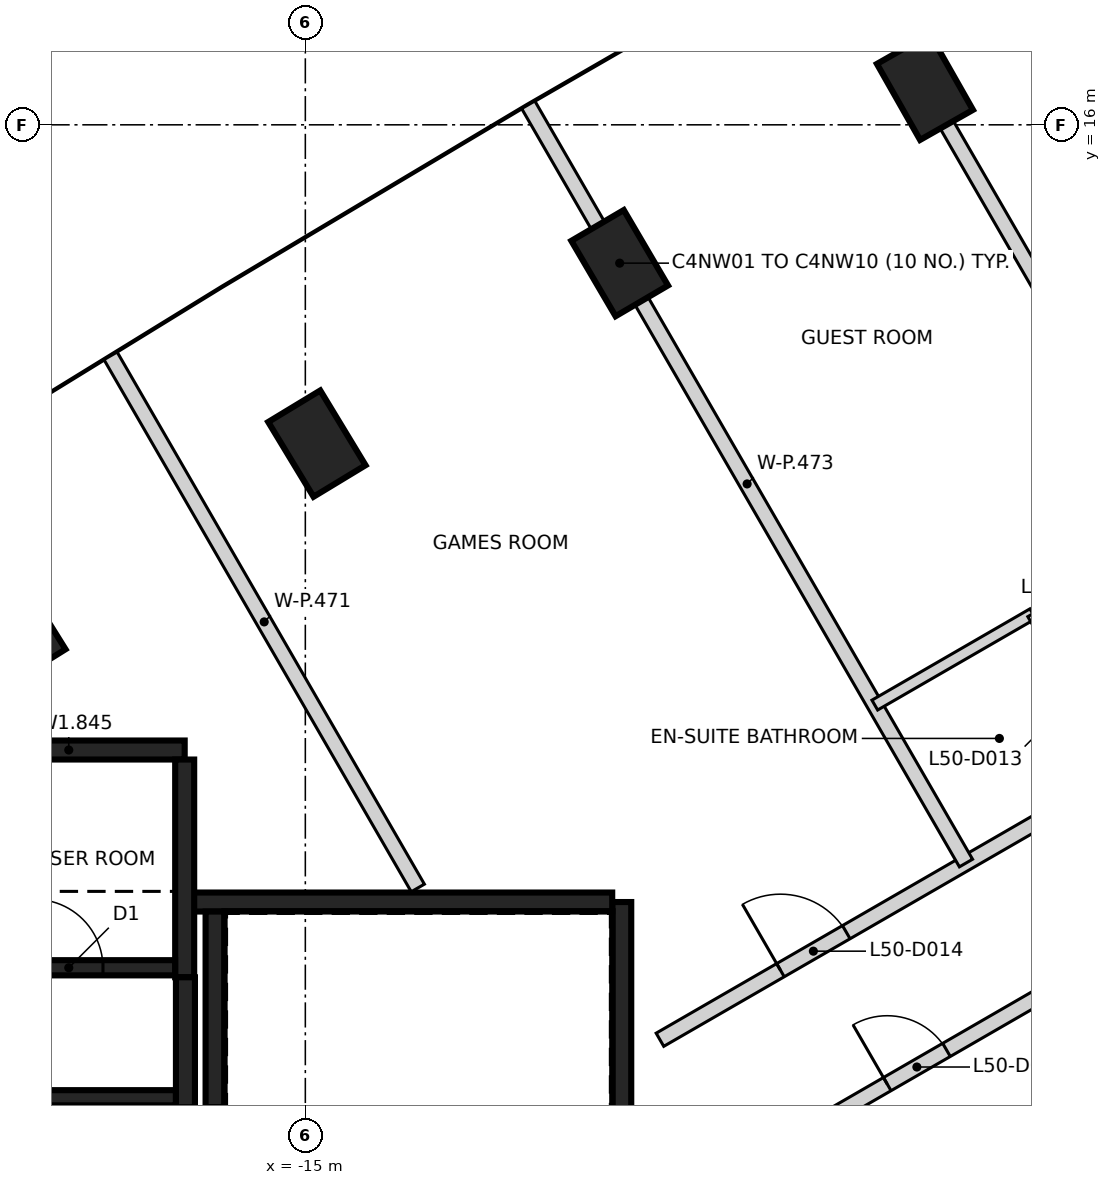
"""IFC4 building model, lengths in metres.
Left out: names, types, materials, properties, quantities, classifications, styles, units other than length and angle.
Written with IfcOpenShell. Run it as: python <this file> out.ifc"""

import sys

from ifc_helpers import new_model, si_unit, direction, frame, frame_2d, origin, origin_2d, place, context, subcontext, project, spatial, rectangle, extrude, element, fill, save


model = new_model("IFC4")
c1 = context("Model", 3, precision=1e-05, world=origin(), true_north=direction((0.0, 1.0)))
c2 = subcontext(c1, "Body", "Model", "MODEL_VIEW")
j1 = project(units=[si_unit("LENGTHUNIT", "METRE"), si_unit("PLANEANGLEUNIT", "RADIAN")], contexts=[c1])
p1 = place(None, origin())
s1 = spatial("IfcSite", under=j1, at=p1, CompositionType="ELEMENT")
p2 = place(p1, origin())
s2 = spatial("IfcBuilding", under=s1, at=p2, CompositionType="ELEMENT")
p3 = place(p2, frame((0.0, 0.0, 200.8)))
s3 = spatial("IfcBuildingStorey", under=s2, at=p3, CompositionType="ELEMENT", Elevation=200.8)
for number, where, z_axis, x_axis in (
    (1, (-6.848, 16.499, -0.35), (0.0, 0.0, 1.0), (-0.494, 0.87, 0.0)),
    (2, (-10.864, 14.18, -0.35), (0.0, 0.0, 1.0), (-0.506, 0.862, 0.0)),
    (3, (-14.848, 11.806, -0.35), (0.0, 0.0, 1.0), (-0.518, 0.855, 0.0)),
    (4, (-18.799, 9.376, -0.35), (0.0, 0.0, 1.0), (-0.529, 0.848, 0.0)),
):
    element("IfcColumn", number, at=place(p3, frame(where, z_axis=z_axis, x_axis=x_axis)), inside=s3, PredefinedType="COLUMN", context=c2, shape_type="SweptSolid", body=[
        extrude(rectangle(XDim=1.15, YDim=0.8, at=origin_2d()), origin(), (0.0, 0.0, 1.0), 3.6),
    ])
p4 = place(p3, frame((-10.837, 5.775, 0.0), z_axis=(0.0, 0.0, 1.0), x_axis=(0.0, -1.0, 0.0)))
e5 = element("IfcWall", 5, at=p4, inside=s3, PredefinedType="SHEAR", context=c2, shape_type="SweptSolid", body=[
    extrude(rectangle(XDim=11.55, YDim=0.25, at=frame_2d((5.775, 0.0))), origin(), (0.0, 0.0, 1.0), 3.25),
])
p5 = place(p4, frame((10.025, 0.0, 0.0)))
e6 = element("IfcOpeningElement", 6, at=p5, cuts=e5, PredefinedType="OPENING", context=c2, shape_type="SweptSolid", body=[
    extrude(rectangle(XDim=1.2, YDim=2.1, at=frame_2d((0.6, 1.05))), frame((0.0, 0.135, 0.0), z_axis=(0.0, -1.0, 0.0), x_axis=(1.0, 0.0, 0.0)), (0.0, 0.0, 1.0), 0.27),
])
p6 = place(p4, frame((8.725, 0.0, 0.0)))
e7 = element("IfcOpeningElement", 7, at=p6, cuts=e5, PredefinedType="OPENING", context=c2, shape_type="SweptSolid", body=[
    extrude(rectangle(XDim=1.2, YDim=2.1, at=frame_2d((0.6, 1.05))), frame((0.0, 0.135, 0.0), z_axis=(0.0, -1.0, 0.0), x_axis=(1.0, 0.0, 0.0)), (0.0, 0.0, 1.0), 0.27),
])
p7 = place(p3, frame((-16.472, 5.775, 0.0), z_axis=(0.0, 0.0, 1.0), x_axis=(1.0, 0.0, 0.0)))
e8 = element("IfcWall", 8, at=p7, inside=s3, PredefinedType="SHEAR", context=c2, shape_type="SweptSolid", body=[
    extrude(rectangle(XDim=5.51, YDim=0.25, at=frame_2d((2.755, 0.0))), origin(), (0.0, 0.0, 1.0), 3.25),
])
p8 = place(p3, frame((-19.637, 7.775, 0.0), z_axis=(0.0, 0.0, 1.0), x_axis=(1.0, 0.0, 0.0)))
e9 = element("IfcWall", 9, at=p8, inside=s3, PredefinedType="SHEAR", context=c2, shape_type="SweptSolid", body=[
    extrude(rectangle(XDim=3.05, YDim=0.25, at=frame_2d((1.525, 0.0))), origin(), (0.0, 0.0, 1.0), 3.25),
])
p9 = place(p3, frame((-16.587, 7.65, 0.0), z_axis=(0.0, 0.0, 1.0), x_axis=(0.0, -1.0, 0.0)))
e10 = element("IfcWall", 10, at=p9, inside=s3, PredefinedType="SHEAR", context=c2, shape_type="SweptSolid", body=[
    extrude(rectangle(XDim=2.865, YDim=0.25, at=frame_2d((1.432, 0.0))), origin(), (0.0, 0.0, 1.0), 3.25),
])
p10 = place(p3, frame((-16.187, 3.075, 0.0), z_axis=(0.0, 0.0, 1.0), x_axis=(0.0, 1.0, 0.0)))
e11 = element("IfcWall", 11, at=p10, inside=s3, PredefinedType="SHEAR", context=c2, shape_type="SweptSolid", body=[
    extrude(rectangle(XDim=2.575, YDim=0.25, at=frame_2d((1.287, 0.0))), origin(), (0.0, 0.0, 1.0), 3.25),
])
p11 = place(p3, frame((-16.577, 4.785, 0.0), z_axis=(0.0, 0.0, 1.0), x_axis=(0.0, -1.0, 0.0)))
e12 = element("IfcWall", 12, at=p11, inside=s3, PredefinedType="SHEAR", context=c2, shape_type="SweptSolid", body=[
    extrude(rectangle(XDim=1.71, YDim=0.25, at=frame_2d((0.855, 0.0))), origin(), (0.0, 0.0, 1.0), 3.25),
])
p12 = place(p3, frame((-19.511, 4.91, 0.0), z_axis=(0.0, 0.0, 1.0), x_axis=(1.0, 0.0, 0.0)))
e13 = element("IfcWall", 13, at=p12, inside=s3, PredefinedType="SHEAR", context=c2, shape_type="SweptSolid", body=[
    extrude(rectangle(XDim=2.798, YDim=0.2, at=frame_2d((1.399, 0.0))), origin(), (0.0, 0.0, 1.0), 3.25),
])
p13 = place(p12, frame((0.949, 0.0, 0.0)))
e14 = element("IfcOpeningElement", 14, at=p13, cuts=e13, PredefinedType="OPENING", context=c2, shape_type="SweptSolid", body=[
    extrude(rectangle(XDim=0.9, YDim=2.1, at=frame_2d((0.45, 1.05))), frame((0.0, 0.11, 0.0), z_axis=(0.0, -1.0, 0.0), x_axis=(1.0, 0.0, 0.0)), (0.0, 0.0, 1.0), 0.22),
])
p14 = place(p3, frame((-19.462, 3.2, 0.0), z_axis=(0.0, 0.0, 1.0), x_axis=(1.0, 0.0, 0.0)))
e15 = element("IfcWall", 15, at=p14, inside=s3, PredefinedType="SHEAR", context=c2, shape_type="SweptSolid", body=[
    extrude(rectangle(XDim=2.759, YDim=0.2, at=frame_2d((1.379, 0.0))), origin(), (0.0, 0.0, 1.0), 3.25),
])
p15 = place(p3, frame((-10.334, 3.963, 0.0), z_axis=(0.0, 0.0, 1.0), x_axis=(0.866013159114, 0.500021207791, 0.0)))
e16 = element("IfcWall", 16, at=p15, inside=s3, PredefinedType="PARTITIONING", context=c2, shape_type="SweptSolid", body=[
    extrude(rectangle(XDim=11.931, YDim=0.2, at=frame_2d((5.966, 0.0))), origin(), (0.0, 0.0, 1.0), 3.25),
])
p16 = place(p15, frame((10.103, 0.0, 0.0)))
e17 = element("IfcOpeningElement", 17, at=p16, cuts=e16, PredefinedType="OPENING", context=c2, shape_type="SweptSolid", body=[
    extrude(rectangle(XDim=1.0, YDim=2.1, at=frame_2d((0.5, 1.05))), frame((0.0, 0.11, 0.0), z_axis=(0.0, -1.0, 0.0), x_axis=(1.0, 0.0, 0.0)), (0.0, 0.0, 1.0), 0.22),
])
p17 = place(p15, frame((8.149, 0.0, 0.0)))
e18 = element("IfcOpeningElement", 18, at=p17, cuts=e16, PredefinedType="OPENING", context=c2, shape_type="SweptSolid", body=[
    extrude(rectangle(XDim=0.95, YDim=2.1, at=frame_2d((0.475, 1.05))), frame((0.0, 0.11, 0.0), z_axis=(0.0, -1.0, 0.0), x_axis=(1.0, 0.0, 0.0)), (0.0, 0.0, 1.0), 0.22),
])
p18 = place(p15, frame((1.831, 0.0, 0.0)))
e19 = element("IfcOpeningElement", 19, at=p18, cuts=e16, PredefinedType="OPENING", context=c2, shape_type="SweptSolid", body=[
    extrude(rectangle(XDim=1.0, YDim=2.1, at=frame_2d((0.5, 1.05))), frame((0.0, 0.11, 0.0), z_axis=(0.0, -1.0, 0.0), x_axis=(1.0, 0.0, 0.0)), (0.0, 0.0, 1.0), 0.22),
])
p19 = place(p3, frame((-8.611, 2.648, 0.0), z_axis=(0.0, 0.0, 1.0), x_axis=(0.865953566425, 0.500124405319, 0.0)))
e20 = element("IfcWall", 20, at=p19, inside=s3, PredefinedType="PARTITIONING", context=c2, shape_type="SweptSolid", body=[
    extrude(rectangle(XDim=12.267, YDim=0.2, at=frame_2d((6.134, 0.0))), origin(), (0.0, 0.0, 1.0), 3.25),
])
p20 = place(p19, frame((9.904, 0.0, 0.0)))
e21 = element("IfcOpeningElement", 21, at=p20, cuts=e20, PredefinedType="OPENING", context=c2, shape_type="SweptSolid", body=[
    extrude(rectangle(XDim=0.9, YDim=2.1, at=frame_2d((0.45, 1.05))), frame((0.0, 0.11, 0.0), z_axis=(0.0, -1.0, 0.0), x_axis=(1.0, 0.0, 0.0)), (0.0, 0.0, 1.0), 0.22),
])
p21 = place(p19, frame((5.683, 0.0, 0.0)))
e22 = element("IfcOpeningElement", 22, at=p21, cuts=e20, PredefinedType="OPENING", context=c2, shape_type="SweptSolid", body=[
    extrude(rectangle(XDim=0.9, YDim=2.1, at=frame_2d((0.45, 1.05))), frame((0.0, 0.11, 0.0), z_axis=(0.0, -1.0, 0.0), x_axis=(1.0, 0.0, 0.0)), (0.0, 0.0, 1.0), 0.22),
])
p22 = place(p19, frame((1.463, 0.0, 0.0)))
e23 = element("IfcOpeningElement", 23, at=p22, cuts=e20, PredefinedType="OPENING", context=c2, shape_type="SweptSolid", body=[
    extrude(rectangle(XDim=0.9, YDim=2.1, at=frame_2d((0.45, 1.05))), frame((0.0, 0.11, 0.0), z_axis=(0.0, -1.0, 0.0), x_axis=(1.0, 0.0, 0.0)), (0.0, 0.0, 1.0), 0.22),
])
p23 = place(p3, frame((-17.562, 12.961, 0.0), z_axis=(0.0, 0.0, 1.0), x_axis=(0.500056194816, -0.865992957262, 0.0)))
e24 = element("IfcWall", 24, at=p23, inside=s3, PredefinedType="PARTITIONING", context=c2, shape_type="SweptSolid", body=[
    extrude(rectangle(XDim=8.084, YDim=0.2, at=frame_2d((4.042, 0.0))), origin(), (0.0, 0.0, 1.0), 2.35),
])
for number, where, z_axis, x_axis in (
    (25, (-12.067, 16.263, 0.0), (0.0, 0.0, 1.0), (0.5, -0.866, 0.0)),
    (26, (-8.052, 18.582, 0.0), (0.0, 0.0, 1.0), (0.5, -0.866, 0.0)),
):
    element("IfcWall", number, at=place(p3, frame(where, z_axis=z_axis, x_axis=x_axis)), inside=s3, PredefinedType="PARTITIONING", context=c2, shape_type="SweptSolid", body=[
        extrude(rectangle(XDim=11.519, YDim=0.2, at=frame_2d((5.759, 0.0))), origin(), (0.0, 0.0, 1.0), 3.25),
    ])
p24 = place(p3, frame((-7.599, 0.923, 0.0), z_axis=(0.0, 0.0, 1.0), x_axis=(0.865957029593, 0.500118408877, 0.0)))
e27 = element("IfcWall", 27, at=p24, inside=s3, PredefinedType="PARTITIONING", context=c2, shape_type="SweptSolid", body=[
    extrude(rectangle(XDim=12.24, YDim=0.2, at=frame_2d((6.12, 0.0))), origin(), (0.0, 0.0, 1.0), 3.25),
])
p25 = place(p3, frame((-7.508, 8.366, 0.0), z_axis=(0.0, 0.0, 1.0), x_axis=(0.865822967017, 0.500350466959, 0.0)))
e28 = element("IfcWall", 28, at=p25, inside=s3, PredefinedType="PARTITIONING", context=c2, shape_type="SweptSolid", body=[
    extrude(rectangle(XDim=2.4, YDim=0.15, at=frame_2d((1.2, 0.0))), origin(), (0.0, 0.0, 1.0), 3.25),
])
p26 = place(p3, frame((-5.43, 9.567, 0.0), z_axis=(0.0, 0.0, 1.0), x_axis=(0.499913221443, -0.866075499611, 0.0)))
e29 = element("IfcWall", 29, at=p26, inside=s3, PredefinedType="PARTITIONING", context=c2, shape_type="SweptSolid", body=[
    extrude(rectangle(XDim=2.4, YDim=0.15, at=frame_2d((1.2, 0.0))), origin(), (0.0, 0.0, 1.0), 3.25),
])
p27 = place(p26, frame((0.801, 0.0, 0.0)))
e30 = element("IfcOpeningElement", 30, at=p27, cuts=e29, PredefinedType="OPENING", context=c2, shape_type="SweptSolid", body=[
    extrude(rectangle(XDim=0.8, YDim=2.1, at=frame_2d((0.4, 1.05))), frame((0.0, 0.085, 0.0), z_axis=(0.0, -1.0, 0.0), x_axis=(1.0, 0.0, 0.0)), (0.0, 0.0, 1.0), 0.17),
])
p28 = place(p13, origin())
e31 = element("IfcDoor", 31, at=p28, inside=s3, OperationType="SINGLE_SWING_LEFT", PredefinedType="DOOR", context=c2, shape_type="SweptSolid", body=[
    extrude(rectangle(XDim=0.9, YDim=2.1, at=frame_2d((0.45, 1.05))), frame((0.0, 0.025, 0.0), z_axis=(0.0, -1.0, 0.0), x_axis=(1.0, 0.0, 0.0)), (0.0, 0.0, 1.0), 0.05),
])
fill(e14, e31)
p29 = place(p18, origin())
e32 = element("IfcDoor", 32, at=p29, inside=s3, OperationType="SINGLE_SWING_LEFT", PredefinedType="DOOR", context=c2, shape_type="SweptSolid", body=[
    extrude(rectangle(XDim=1.0, YDim=2.1, at=frame_2d((0.5, 1.05))), frame((0.0, 0.025, 0.0), z_axis=(0.0, -1.0, 0.0), x_axis=(1.0, 0.0, 0.0)), (0.0, 0.0, 1.0), 0.05),
])
fill(e19, e32)
p30 = place(p22, frame((0.9, 0.0, 0.0), z_axis=(0.0, 0.0, 1.0), x_axis=(-1.0, 0.0, 0.0)))
e33 = element("IfcDoor", 33, at=p30, inside=s3, OperationType="SINGLE_SWING_LEFT", PredefinedType="DOOR", context=c2, shape_type="SweptSolid", body=[
    extrude(rectangle(XDim=0.9, YDim=2.1, at=frame_2d((0.45, 1.05))), frame((0.0, 0.025, 0.0), z_axis=(0.0, -1.0, 0.0), x_axis=(1.0, 0.0, 0.0)), (0.0, 0.0, 1.0), 0.05),
])
fill(e23, e33)
save(model, sys.argv[1])
